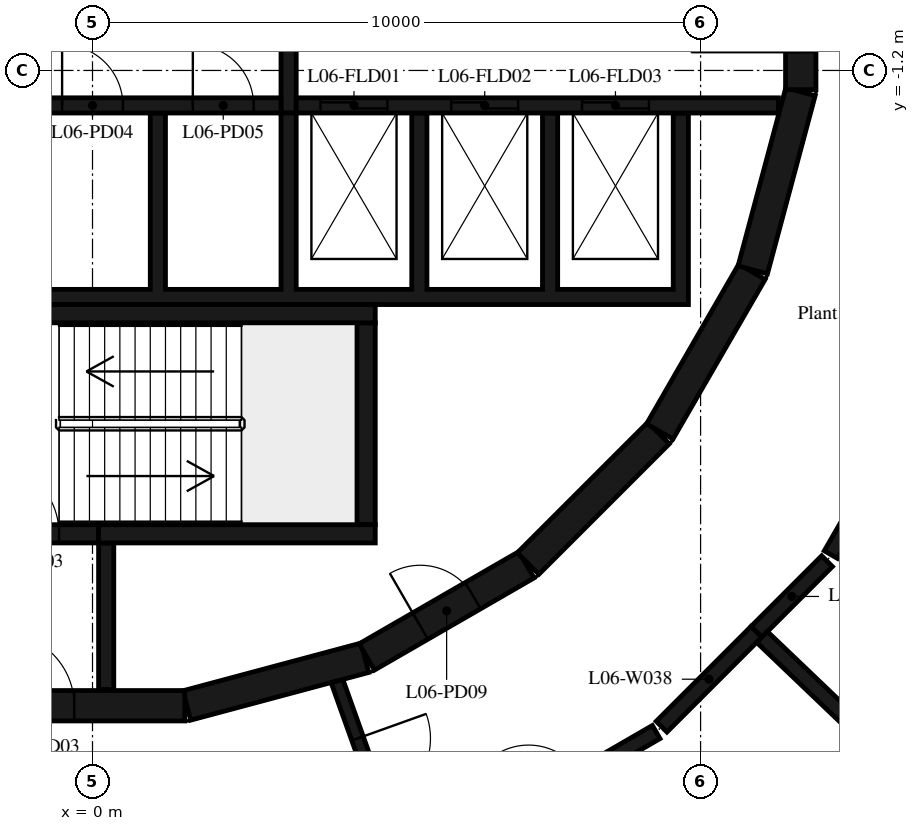
"""IFC4 building model, lengths in metres.
Left out: names, types, materials, properties, quantities, classifications, styles, units other than length and angle.
Written with IfcOpenShell. Run it as: python <this file> out.ifc"""

import sys

from ifc_helpers import new_model, si_unit, direction, frame, frame_2d, origin, place, context, subcontext, project, spatial, polyline, rectangle, outline, extrude, element, fill, save


model = new_model("IFC4")
c1 = context("Model", 3, precision=1e-05, world=origin(), true_north=direction((0.0, 1.0)))
c2 = subcontext(c1, "Body", "Model", "MODEL_VIEW")
j1 = project(units=[si_unit("LENGTHUNIT", "METRE"), si_unit("PLANEANGLEUNIT", "RADIAN")], contexts=[c1])
p1 = place(None, origin())
s1 = spatial("IfcSite", under=j1, at=p1, CompositionType="ELEMENT")
p2 = place(p1, origin())
s2 = spatial("IfcBuilding", under=s1, at=p2, CompositionType="ELEMENT")
p3 = place(p2, frame((0.0, 0.0, 33.0)))
s3 = spatial("IfcBuildingStorey", under=s2, at=p3, CompositionType="ELEMENT", Elevation=33.0)
p4 = place(p3, frame((1.55, -11.643, 0.0), z_axis=(0.0, 0.0, 1.0), x_axis=(0.965948410781, 0.258734743916, 0.0)))
e1 = element("IfcWall", 1, at=p4, inside=s3, PredefinedType="SHEAR", context=c2, shape_type="SweptSolid", body=[
    extrude(rectangle(XDim=3.033, YDim=0.5, at=frame_2d((1.516, 0.0))), origin(), (0.0, 0.0, 1.0), 4.95),
])
p5 = place(p3, frame((4.51, -10.845, 0.0), z_axis=(0.0, 0.0, 1.0), x_axis=(0.865975092491, 0.500087131594, 0.0)))
e2 = element("IfcWall", 2, at=p5, inside=s3, PredefinedType="SHEAR", context=c2, shape_type="SweptSolid", body=[
    extrude(rectangle(XDim=3.033, YDim=0.5, at=frame_2d((1.516, 0.0))), origin(), (0.0, 0.0, 1.0), 4.95),
])
p6 = place(p5, frame((1.016, 0.0, 0.0)))
e3 = element("IfcOpeningElement", 3, at=p6, cuts=e2, PredefinedType="OPENING", context=c2, shape_type="SweptSolid", body=[
    extrude(rectangle(XDim=1.0, YDim=2.4, at=frame_2d((0.5, 1.2))), frame((0.0, 0.26, 0.0), z_axis=(0.0, -1.0, 0.0), x_axis=(1.0, 0.0, 0.0)), (0.0, 0.0, 1.0), 0.52),
])
p7 = place(p3, frame((7.164, -9.308, 0.0), z_axis=(0.0, 0.0, 1.0), x_axis=(0.707106781187, 0.707106781187, 0.0)))
e4 = element("IfcWall", 4, at=p7, inside=s3, PredefinedType="SHEAR", context=c2, shape_type="SweptSolid", body=[
    extrude(rectangle(XDim=3.032, YDim=0.5, at=frame_2d((1.516, 0.0))), origin(), (0.0, 0.0, 1.0), 4.95),
])
for number, where, z_axis, x_axis in (
    (5, (9.329, -7.137, 0.0), (0.0, 0.0, 1.0), (0.5, 0.866, 0.0)),
    (6, (10.858, -4.479, 0.0), (0.0, 0.0, 1.0), (0.259, 0.966, 0.0)),
):
    element("IfcWall", number, at=place(p3, frame(where, z_axis=z_axis, x_axis=x_axis)), inside=s3, PredefinedType="SHEAR", context=c2, shape_type="SweptSolid", body=[
        extrude(rectangle(XDim=3.033, YDim=0.5, at=frame_2d((1.516, 0.0))), origin(), (0.0, 0.0, 1.0), 4.95),
    ])
p8 = place(p3, frame((11.647, -1.516, 0.0), z_axis=(0.0, 0.0, 1.0), x_axis=(0.0, 1.0, 0.0)))
e7 = element("IfcWall", 7, at=p8, inside=s3, PredefinedType="SHEAR", context=c2, shape_type="SweptSolid", body=[
    extrude(rectangle(XDim=3.033, YDim=0.5, at=frame_2d((1.516, 0.0))), origin(), (0.0, 0.0, 1.0), 4.95),
])
p9 = place(p8, frame((0.616, 0.0, 0.0)))
e8 = element("IfcOpeningElement", 8, at=p9, cuts=e7, PredefinedType="OPENING", context=c2, shape_type="SweptSolid", body=[
    extrude(rectangle(XDim=1.8, YDim=2.1, at=frame_2d((0.9, 1.05))), frame((0.0, 0.26, 0.0), z_axis=(0.0, -1.0, 0.0), x_axis=(1.0, 0.0, 0.0)), (0.0, 0.0, 1.0), 0.52),
])
p10 = place(p3, frame((-1.516, -11.647, 0.0), z_axis=(0.0, 0.0, 1.0), x_axis=(1.0, 0.0, 0.0)))
e9 = element("IfcWall", 9, at=p10, inside=s3, PredefinedType="SHEAR", context=c2, shape_type="SweptSolid", body=[
    extrude(rectangle(XDim=3.033, YDim=0.5, at=frame_2d((1.516, 0.0))), origin(), (0.0, 0.0, 1.0), 4.95),
])
p11 = place(p10, frame((0.016, 0.0, 0.0)))
e10 = element("IfcOpeningElement", 10, at=p11, cuts=e9, PredefinedType="OPENING", context=c2, shape_type="SweptSolid", body=[
    extrude(rectangle(XDim=1.2, YDim=2.1, at=frame_2d((0.6, 1.05))), frame((0.0, 0.26, 0.0), z_axis=(0.0, -1.0, 0.0), x_axis=(1.0, 0.0, 0.0)), (0.0, 0.0, 1.0), 0.52),
])
p12 = place(p3, frame((-2.4, -5.2, 0.0), z_axis=(0.0, 0.0, 1.0), x_axis=(1.0, 0.0, 0.0)))
e11 = element("IfcWall", 11, at=p12, inside=s3, PredefinedType="SHEAR", context=c2, shape_type="SweptSolid", body=[
    extrude(rectangle(XDim=7.05, YDim=0.3, at=frame_2d((3.525, 0.0))), origin(), (0.0, 0.0, 1.0), 4.95),
])
p13 = place(p3, frame((4.5, -8.67, 0.0), z_axis=(0.0, 0.0, 1.0), x_axis=(0.0, 1.0, 0.0)))
e12 = element("IfcWall", 12, at=p13, inside=s3, PredefinedType="SHEAR", context=c2, shape_type="SweptSolid", body=[
    extrude(rectangle(XDim=3.32, YDim=0.3, at=frame_2d((1.66, 0.0))), origin(), (0.0, 0.0, 1.0), 4.95),
])
p14 = place(p3, frame((0.1, -8.82, 0.0), z_axis=(0.0, 0.0, 1.0), x_axis=(1.0, 0.0, 0.0)))
e13 = element("IfcWall", 13, at=p14, inside=s3, PredefinedType="SHEAR", context=c2, shape_type="SweptSolid", body=[
    extrude(rectangle(XDim=4.55, YDim=0.3, at=frame_2d((2.275, 0.0))), origin(), (0.0, 0.0, 1.0), 4.95),
])
p15 = place(p3, frame((-2.4, -8.82, 0.0), z_axis=(0.0, 0.0, 1.0), x_axis=(1.0, 0.0, 0.0)))
e14 = element("IfcWall", 14, at=p15, inside=s3, PredefinedType="SHEAR", context=c2, shape_type="SweptSolid", body=[
    extrude(rectangle(XDim=2.5, YDim=0.3, at=frame_2d((1.25, 0.0))), origin(), (0.0, 0.0, 1.0), 4.95),
])
p16 = place(p15, frame((0.65, 0.0, 0.0)))
e15 = element("IfcOpeningElement", 15, at=p16, cuts=e14, PredefinedType="OPENING", context=c2, shape_type="SweptSolid", body=[
    extrude(rectangle(XDim=1.2, YDim=2.1, at=frame_2d((0.6, 1.05))), frame((0.0, 0.16, 0.0), z_axis=(0.0, -1.0, 0.0), x_axis=(1.0, 0.0, 0.0)), (0.0, 0.0, 1.0), 0.32),
])
p17 = place(p3, frame((0.225, -8.97, 0.0), z_axis=(0.0, 0.0, 1.0), x_axis=(0.0, -1.0, 0.0)))
e16 = element("IfcWall", 16, at=p17, inside=s3, PredefinedType="SHEAR", context=c2, shape_type="SweptSolid", body=[
    extrude(rectangle(XDim=2.41, YDim=0.25, at=frame_2d((1.205, 0.0))), origin(), (0.0, 0.0, 1.0), 4.95),
])
p18 = place(p3, origin())
e17 = element("IfcWall", 17, at=p18, inside=s3, PredefinedType="SHEAR", context=c2, shape_type="SweptSolid", body=[
    extrude(outline(polyline([(9.8, -5.05), (9.8, -4.8), (9.8, -1.9), (9.55, -1.9), (9.55, -4.8), (7.65, -4.8), (7.65, -1.9), (7.4, -1.9), (7.4, -4.8), (5.5, -4.8), (5.5, -1.9), (5.25, -1.9), (5.25, -4.8), (3.35, -4.8), (3.35, -1.9), (3.1, -1.9), (3.1, -4.8), (1.2, -4.8), (1.2, -1.9), (0.95, -1.9), (0.95, -4.8), (-0.95, -4.8), (-0.95, -1.9), (-1.2, -1.9), (-1.2, -4.8), (-5.25, -4.8), (-5.25, -1.9), (-5.5, -1.9), (-5.5, -4.8), (-7.4, -4.8), (-7.4, -1.9), (-7.65, -1.9), (-7.65, -4.8), (-9.55, -4.8), (-9.55, -1.9), (-9.8, -1.9), (-9.8, -4.8), (-9.8, -5.05), (9.8, -5.05)])), origin(), (0.0, 0.0, 1.0), 4.95),
])
p19 = place(p3, frame((-11.28, -1.775, 0.0), z_axis=(0.0, 0.0, 1.0), x_axis=(1.0, 0.0, 0.0)))
e18 = element("IfcWall", 18, at=p19, inside=s3, PredefinedType="SHEAR", context=c2, shape_type="SweptSolid", body=[
    extrude(rectangle(XDim=14.38, YDim=0.25, at=frame_2d((7.19, 0.0))), origin(), (0.0, 0.0, 1.0), 4.95),
])
p20 = place(p19, frame((7.555, 0.0, 0.0)))
e19 = element("IfcOpeningElement", 19, at=p20, cuts=e18, PredefinedType="OPENING", context=c2, shape_type="SweptSolid", body=[
    extrude(rectangle(XDim=1.0, YDim=2.4, at=frame_2d((0.5, 1.2))), frame((0.0, 0.135, 0.0), z_axis=(0.0, -1.0, 0.0), x_axis=(1.0, 0.0, 0.0)), (0.0, 0.0, 1.0), 0.27),
])
p21 = place(p19, frame((10.78, 0.0, 0.0)))
e20 = element("IfcOpeningElement", 20, at=p21, cuts=e18, PredefinedType="OPENING", context=c2, shape_type="SweptSolid", body=[
    extrude(rectangle(XDim=1.0, YDim=2.4, at=frame_2d((0.5, 1.2))), frame((0.0, 0.135, 0.0), z_axis=(0.0, -1.0, 0.0), x_axis=(1.0, 0.0, 0.0)), (0.0, 0.0, 1.0), 0.27),
])
p22 = place(p19, frame((12.93, 0.0, 0.0)))
e21 = element("IfcOpeningElement", 21, at=p22, cuts=e18, PredefinedType="OPENING", context=c2, shape_type="SweptSolid", body=[
    extrude(rectangle(XDim=1.0, YDim=2.4, at=frame_2d((0.5, 1.2))), frame((0.0, 0.135, 0.0), z_axis=(0.0, -1.0, 0.0), x_axis=(1.0, 0.0, 0.0)), (0.0, 0.0, 1.0), 0.27),
])
p23 = place(p3, frame((3.35, -1.775, 0.0), z_axis=(0.0, 0.0, 1.0), x_axis=(1.0, 0.0, 0.0)))
e22 = element("IfcWall", 22, at=p23, inside=s3, PredefinedType="SHEAR", context=c2, shape_type="SweptSolid", body=[
    extrude(rectangle(XDim=7.93, YDim=0.25, at=frame_2d((3.965, 0.0))), origin(), (0.0, 0.0, 1.0), 4.95),
])
p24 = place(p23, frame((0.4, 0.0, 0.0)))
e23 = element("IfcOpeningElement", 23, at=p24, cuts=e22, PredefinedType="OPENING", context=c2, shape_type="SweptSolid", body=[
    extrude(rectangle(XDim=1.1, YDim=2.4, at=frame_2d((0.55, 1.2))), frame((0.0, 0.135, 0.0), z_axis=(0.0, -1.0, 0.0), x_axis=(1.0, 0.0, 0.0)), (0.0, 0.0, 1.0), 0.27),
])
p25 = place(p23, frame((2.55, 0.0, 0.0)))
e24 = element("IfcOpeningElement", 24, at=p25, cuts=e22, PredefinedType="OPENING", context=c2, shape_type="SweptSolid", body=[
    extrude(rectangle(XDim=1.1, YDim=2.4, at=frame_2d((0.55, 1.2))), frame((0.0, 0.135, 0.0), z_axis=(0.0, -1.0, 0.0), x_axis=(1.0, 0.0, 0.0)), (0.0, 0.0, 1.0), 0.27),
])
p26 = place(p23, frame((4.7, 0.0, 0.0)))
e25 = element("IfcOpeningElement", 25, at=p26, cuts=e22, PredefinedType="OPENING", context=c2, shape_type="SweptSolid", body=[
    extrude(rectangle(XDim=1.1, YDim=2.4, at=frame_2d((0.55, 1.2))), frame((0.0, 0.135, 0.0), z_axis=(0.0, -1.0, 0.0), x_axis=(1.0, 0.0, 0.0)), (0.0, 0.0, 1.0), 0.27),
])
p27 = place(p3, frame((3.225, -1.9, 0.0), z_axis=(0.0, 0.0, 1.0), x_axis=(0.0, 1.0, 0.0)))
e26 = element("IfcWall", 26, at=p27, inside=s3, PredefinedType="SHEAR", context=c2, shape_type="SweptSolid", body=[
    extrude(rectangle(XDim=3.8, YDim=0.25, at=frame_2d((1.9, 0.0))), origin(), (0.0, 0.0, 1.0), 4.95),
])
p28 = place(p3, frame((4.02, -11.24, 0.0), z_axis=(0.0, 0.0, 1.0), x_axis=(0.336751058688, -0.941593715183, 0.0)))
e27 = element("IfcWall", 27, at=p28, inside=s3, PredefinedType="PARTITIONING", context=c2, shape_type="SweptSolid", body=[
    extrude(rectangle(XDim=3.207, YDim=0.2, at=frame_2d((1.604, 0.0))), origin(), (0.0, 0.0, 1.0), 4.95),
])
p29 = place(p28, frame((1.004, 0.0, 0.0)))
e28 = element("IfcOpeningElement", 28, at=p29, cuts=e27, PredefinedType="OPENING", context=c2, shape_type="SweptSolid", body=[
    extrude(rectangle(XDim=1.2, YDim=2.1, at=frame_2d((0.6, 1.05))), frame((0.0, 0.11, 0.0), z_axis=(0.0, -1.0, 0.0), x_axis=(1.0, 0.0, 0.0)), (0.0, 0.0, 1.0), 0.22),
])
p30 = place(p3, frame((5.938, -14.007, 0.0), z_axis=(0.0, 0.0, 1.0), x_axis=(0.865615852585, 0.500708693508, 0.0)))
e29 = element("IfcWall", 29, at=p30, inside=s3, PredefinedType="PARTITIONING", context=c2, shape_type="SweptSolid", body=[
    extrude(rectangle(XDim=3.849, YDim=0.25, at=frame_2d((1.925, 0.0))), origin(), (0.0, 0.0, 1.0), 4.95),
])
p31 = place(p30, frame((1.425, 0.0, 0.0)))
e30 = element("IfcOpeningElement", 30, at=p31, cuts=e29, PredefinedType="OPENING", context=c2, shape_type="SweptSolid", body=[
    extrude(rectangle(XDim=1.0, YDim=2.1, at=frame_2d((0.5, 1.05))), frame((0.0, 0.135, 0.0), z_axis=(0.0, -1.0, 0.0), x_axis=(1.0, 0.0, 0.0)), (0.0, 0.0, 1.0), 0.27),
])
p32 = place(p3, frame((9.358, -11.992, 0.0), z_axis=(0.0, 0.0, 1.0), x_axis=(0.707051506082, 0.707162051971, 0.0)))
e31 = element("IfcWall", 31, at=p32, inside=s3, PredefinedType="PARTITIONING", context=c2, shape_type="SweptSolid", body=[
    extrude(rectangle(XDim=2.208, YDim=0.25, at=frame_2d((1.104, 0.0))), origin(), (0.0, 0.0, 1.0), 4.95),
])
p33 = place(p3, frame((10.92, -10.43, 0.0), z_axis=(0.0, 0.0, 1.0), x_axis=(0.707181186066, 0.707032368477, 0.0)))
e32 = element("IfcWall", 32, at=p33, inside=s3, PredefinedType="PARTITIONING", context=c2, shape_type="SweptSolid", body=[
    extrude(rectangle(XDim=1.641, YDim=0.25, at=frame_2d((0.82, 0.0))), origin(), (0.0, 0.0, 1.0), 4.95),
])
p34 = place(p3, frame((11.01, -10.516, 0.0), z_axis=(0.0, 0.0, 1.0), x_axis=(0.723132638847, -0.690709191074, 0.0)))
e33 = element("IfcWall", 33, at=p34, inside=s3, PredefinedType="PARTITIONING", context=c2, shape_type="SweptSolid", body=[
    extrude(rectangle(XDim=13.057, YDim=0.25, at=frame_2d((6.528, 0.0))), origin(), (0.0, 0.0, 1.0), 4.95),
])
p35 = place(p3, frame((12.143, -9.162, 0.0), z_axis=(0.0, 0.0, 1.0), x_axis=(0.500756218026, 0.865588360659, 0.0)))
e34 = element("IfcWall", 34, at=p35, inside=s3, PredefinedType="PARTITIONING", context=c2, shape_type="SweptSolid", body=[
    extrude(rectangle(XDim=3.849, YDim=0.25, at=frame_2d((1.925, 0.0))), origin(), (0.0, 0.0, 1.0), 4.95),
])
p36 = place(p16, origin())
e35 = element("IfcDoor", 35, at=p36, inside=s3, OperationType="SINGLE_SWING_LEFT", PredefinedType="DOOR", context=c2, shape_type="SweptSolid", body=[
    extrude(rectangle(XDim=1.2, YDim=2.1, at=frame_2d((0.6, 1.05))), frame((0.0, 0.025, 0.0), z_axis=(0.0, -1.0, 0.0), x_axis=(1.0, 0.0, 0.0)), (0.0, 0.0, 1.0), 0.05),
])
fill(e15, e35)
p37 = place(p11, origin())
e36 = element("IfcDoor", 36, at=p37, inside=s3, OperationType="SINGLE_SWING_RIGHT", PredefinedType="DOOR", context=c2, shape_type="SweptSolid", body=[
    extrude(rectangle(XDim=1.2, YDim=2.1, at=frame_2d((0.6, 1.05))), frame((0.0, 0.025, 0.0), z_axis=(0.0, -1.0, 0.0), x_axis=(1.0, 0.0, 0.0)), (0.0, 0.0, 1.0), 0.05),
])
fill(e10, e36)
p38 = place(p9, origin())
e37 = element("IfcDoor", 37, at=p38, inside=s3, OperationType="DOUBLE_DOOR_SINGLE_SWING", PredefinedType="DOOR", context=c2, shape_type="SweptSolid", body=[
    extrude(rectangle(XDim=1.8, YDim=2.1, at=frame_2d((0.9, 1.05))), frame((0.0, 0.025, 0.0), z_axis=(0.0, -1.0, 0.0), x_axis=(1.0, 0.0, 0.0)), (0.0, 0.0, 1.0), 0.05),
])
fill(e8, e37)
p39 = place(p24, origin())
e38 = element("IfcDoor", 38, at=p39, inside=s3, OperationType="DOUBLE_DOOR_SLIDING", PredefinedType="DOOR", context=c2, shape_type="SweptSolid", body=[
    extrude(rectangle(XDim=1.1, YDim=2.4, at=frame_2d((0.55, 1.2))), frame((0.0, 0.025, 0.0), z_axis=(0.0, -1.0, 0.0), x_axis=(1.0, 0.0, 0.0)), (0.0, 0.0, 1.0), 0.05),
])
fill(e23, e38)
p40 = place(p25, origin())
e39 = element("IfcDoor", 39, at=p40, inside=s3, OperationType="DOUBLE_DOOR_SLIDING", PredefinedType="DOOR", context=c2, shape_type="SweptSolid", body=[
    extrude(rectangle(XDim=1.1, YDim=2.4, at=frame_2d((0.55, 1.2))), frame((0.0, 0.025, 0.0), z_axis=(0.0, -1.0, 0.0), x_axis=(1.0, 0.0, 0.0)), (0.0, 0.0, 1.0), 0.05),
])
fill(e24, e39)
p41 = place(p26, origin())
e40 = element("IfcDoor", 40, at=p41, inside=s3, OperationType="DOUBLE_DOOR_SLIDING", PredefinedType="DOOR", context=c2, shape_type="SweptSolid", body=[
    extrude(rectangle(XDim=1.1, YDim=2.4, at=frame_2d((0.55, 1.2))), frame((0.0, 0.025, 0.0), z_axis=(0.0, -1.0, 0.0), x_axis=(1.0, 0.0, 0.0)), (0.0, 0.0, 1.0), 0.05),
])
fill(e25, e40)
p42 = place(p21, origin())
e41 = element("IfcDoor", 41, at=p42, inside=s3, OperationType="SINGLE_SWING_LEFT", PredefinedType="DOOR", context=c2, shape_type="SweptSolid", body=[
    extrude(rectangle(XDim=1.0, YDim=2.4, at=frame_2d((0.5, 1.2))), frame((0.0, 0.025, 0.0), z_axis=(0.0, -1.0, 0.0), x_axis=(1.0, 0.0, 0.0)), (0.0, 0.0, 1.0), 0.05),
])
fill(e20, e41)
p43 = place(p22, origin())
e42 = element("IfcDoor", 42, at=p43, inside=s3, OperationType="SINGLE_SWING_RIGHT", PredefinedType="DOOR", context=c2, shape_type="SweptSolid", body=[
    extrude(rectangle(XDim=1.0, YDim=2.4, at=frame_2d((0.5, 1.2))), frame((0.0, 0.025, 0.0), z_axis=(0.0, -1.0, 0.0), x_axis=(1.0, 0.0, 0.0)), (0.0, 0.0, 1.0), 0.05),
])
fill(e21, e42)
p44 = place(p6, origin())
e43 = element("IfcDoor", 43, at=p44, inside=s3, OperationType="SINGLE_SWING_RIGHT", PredefinedType="DOOR", context=c2, shape_type="SweptSolid", body=[
    extrude(rectangle(XDim=1.0, YDim=2.4, at=frame_2d((0.5, 1.2))), frame((0.0, 0.025, 0.0), z_axis=(0.0, -1.0, 0.0), x_axis=(1.0, 0.0, 0.0)), (0.0, 0.0, 1.0), 0.05),
])
fill(e3, e43)
p45 = place(p29, origin())
e44 = element("IfcDoor", 44, at=p45, inside=s3, OperationType="SINGLE_SWING_LEFT", PredefinedType="DOOR", context=c2, shape_type="SweptSolid", body=[
    extrude(rectangle(XDim=1.2, YDim=2.1, at=frame_2d((0.6, 1.05))), frame((0.0, 0.025, 0.0), z_axis=(0.0, -1.0, 0.0), x_axis=(1.0, 0.0, 0.0)), (0.0, 0.0, 1.0), 0.05),
])
fill(e28, e44)
save(model, sys.argv[1])
